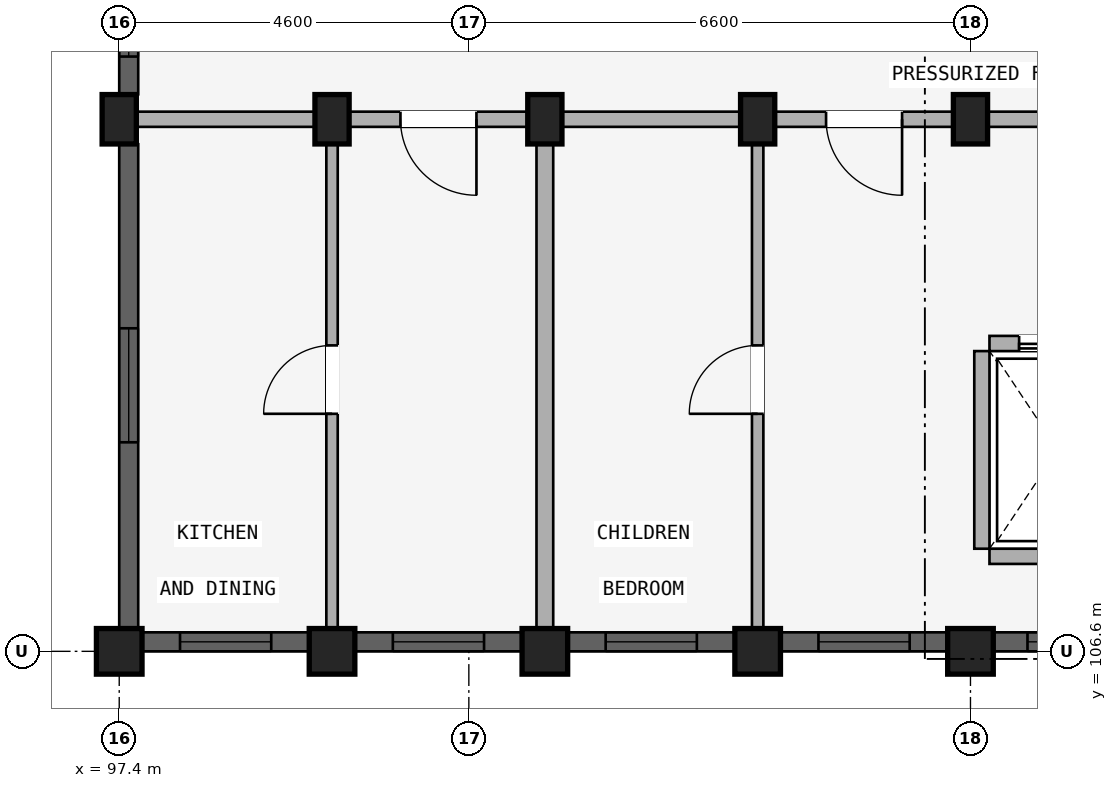
"""IFC4 building model, lengths in metres.
Left out: names, types, materials, properties, quantities, classifications, styles, units other than length and angle.
Written with IfcOpenShell. Run it as: python <this file> out.ifc"""

import sys

from ifc_helpers import new_model, si_unit, direction, frame, frame_2d, origin, origin_2d, place, context, subcontext, project, spatial, rectangle, extrude, element, fill, save


model = new_model("IFC4")
c1 = context("Model", 3, precision=1e-05, world=origin(), true_north=direction((0.0, 1.0)))
c2 = subcontext(c1, "Body", "Model", "MODEL_VIEW")
j1 = project(units=[si_unit("LENGTHUNIT", "METRE"), si_unit("PLANEANGLEUNIT", "RADIAN")], contexts=[c1])
p1 = place(None, origin())
s1 = spatial("IfcSite", under=j1, at=p1, CompositionType="ELEMENT")
p2 = place(p1, origin())
s2 = spatial("IfcBuilding", under=s1, at=p2, CompositionType="ELEMENT")
p3 = place(p2, frame((0.0, 0.0, 30.75)))
s3 = spatial("IfcBuildingStorey", under=s2, at=p3, CompositionType="ELEMENT", Elevation=30.75)
p4 = place(p3, frame((108.6, 106.6, 0.0), z_axis=(0.0, 0.0, 1.0), x_axis=(1.0, 0.0, 0.0)))
e1 = element("IfcColumn", 1, at=p4, inside=s3, PredefinedType="COLUMN", context=c2, shape_type="SweptSolid", body=[
    extrude(rectangle(XDim=0.6, YDim=0.6, at=origin_2d()), origin(), (0.0, 0.0, 1.0), 2.93),
])
p5 = place(p3, frame((108.6, 113.6, 0.0), z_axis=(0.0, 0.0, 1.0), x_axis=(1.0, 0.0, 0.0)))
e2 = element("IfcColumn", 2, at=p5, inside=s3, PredefinedType="COLUMN", context=c2, shape_type="SweptSolid", body=[
    extrude(rectangle(XDim=0.45, YDim=0.65, at=origin_2d()), origin(), (0.0, 0.0, 1.0), 2.93),
])
p6 = place(p3, frame((105.8, 106.6, 0.0), z_axis=(0.0, 0.0, 1.0), x_axis=(1.0, 0.0, 0.0)))
e3 = element("IfcColumn", 3, at=p6, inside=s3, PredefinedType="COLUMN", context=c2, shape_type="SweptSolid", body=[
    extrude(rectangle(XDim=0.6, YDim=0.6, at=origin_2d()), origin(), (0.0, 0.0, 1.0), 2.93),
])
p7 = place(p3, frame((105.8, 113.6, 0.0), z_axis=(0.0, 0.0, 1.0), x_axis=(1.0, 0.0, 0.0)))
e4 = element("IfcColumn", 4, at=p7, inside=s3, PredefinedType="COLUMN", context=c2, shape_type="SweptSolid", body=[
    extrude(rectangle(XDim=0.45, YDim=0.65, at=origin_2d()), origin(), (0.0, 0.0, 1.0), 2.93),
])
p8 = place(p3, frame((103.0, 106.6, 0.0), z_axis=(0.0, 0.0, 1.0), x_axis=(1.0, 0.0, 0.0)))
e5 = element("IfcColumn", 5, at=p8, inside=s3, PredefinedType="COLUMN", context=c2, shape_type="SweptSolid", body=[
    extrude(rectangle(XDim=0.6, YDim=0.6, at=origin_2d()), origin(), (0.0, 0.0, 1.0), 2.93),
])
p9 = place(p3, frame((103.0, 113.6, 0.0), z_axis=(0.0, 0.0, 1.0), x_axis=(1.0, 0.0, 0.0)))
e6 = element("IfcColumn", 6, at=p9, inside=s3, PredefinedType="COLUMN", context=c2, shape_type="SweptSolid", body=[
    extrude(rectangle(XDim=0.45, YDim=0.65, at=origin_2d()), origin(), (0.0, 0.0, 1.0), 2.93),
])
p10 = place(p3, frame((100.2, 106.6, 0.0), z_axis=(0.0, 0.0, 1.0), x_axis=(1.0, 0.0, 0.0)))
e7 = element("IfcColumn", 7, at=p10, inside=s3, PredefinedType="COLUMN", context=c2, shape_type="SweptSolid", body=[
    extrude(rectangle(XDim=0.6, YDim=0.6, at=origin_2d()), origin(), (0.0, 0.0, 1.0), 2.93),
])
p11 = place(p3, frame((100.2, 113.6, 0.0), z_axis=(0.0, 0.0, 1.0), x_axis=(1.0, 0.0, 0.0)))
e8 = element("IfcColumn", 8, at=p11, inside=s3, PredefinedType="COLUMN", context=c2, shape_type="SweptSolid", body=[
    extrude(rectangle(XDim=0.45, YDim=0.65, at=origin_2d()), origin(), (0.0, 0.0, 1.0), 2.93),
])
p12 = place(p3, frame((97.4, 106.6, 0.0), z_axis=(0.0, 0.0, 1.0), x_axis=(1.0, 0.0, 0.0)))
e9 = element("IfcColumn", 9, at=p12, inside=s3, PredefinedType="COLUMN", context=c2, shape_type="SweptSolid", body=[
    extrude(rectangle(XDim=0.6, YDim=0.6, at=origin_2d()), origin(), (0.0, 0.0, 1.0), 2.93),
])
p13 = place(p3, frame((97.4, 113.6, 0.0), z_axis=(0.0, 0.0, 1.0), x_axis=(1.0, 0.0, 0.0)))
e10 = element("IfcColumn", 10, at=p13, inside=s3, PredefinedType="COLUMN", context=c2, shape_type="SweptSolid", body=[
    extrude(rectangle(XDim=0.45, YDim=0.65, at=origin_2d()), origin(), (0.0, 0.0, 1.0), 2.93),
])
p14 = place(p3, frame((108.75, 107.95, 0.0), z_axis=(0.0, 0.0, 1.0), x_axis=(0.0, 1.0, 0.0)))
e11 = element("IfcWall", 11, at=p14, inside=s3, PredefinedType="STANDARD", context=c2, shape_type="SweptSolid", body=[
    extrude(rectangle(XDim=2.6, YDim=0.2, at=frame_2d((1.3, 0.0))), origin(), (0.0, 0.0, 1.0), 2.372),
])
p15 = place(p3, frame((110.65, 107.85, 0.0), z_axis=(0.0, 0.0, 1.0), x_axis=(-1.0, 0.0, 0.0)))
e12 = element("IfcWall", 12, at=p15, inside=s3, PredefinedType="STANDARD", context=c2, shape_type="SweptSolid", body=[
    extrude(rectangle(XDim=1.8, YDim=0.2, at=frame_2d((0.9, 0.0))), origin(), (0.0, 0.0, 1.0), 2.93),
])
p16 = place(p3, frame((110.65, 110.65, 0.0), z_axis=(0.0, 0.0, 1.0), x_axis=(-1.0, 0.0, 0.0)))
e13 = element("IfcWall", 13, at=p16, inside=s3, PredefinedType="STANDARD", context=c2, shape_type="SweptSolid", body=[
    extrude(rectangle(XDim=1.8, YDim=0.2, at=frame_2d((0.9, 0.0))), origin(), (0.0, 0.0, 1.0), 2.93),
])
p17 = place(p16, frame((0.39, 0.0, 0.0)))
e14 = element("IfcOpeningElement", 14, at=p17, cuts=e13, PredefinedType="OPENING", context=c2, shape_type="SweptSolid", body=[
    extrude(rectangle(XDim=1.02, YDim=2.15, at=frame_2d((0.51, 1.075))), frame((0.0, 0.11, 0.0), z_axis=(0.0, -1.0, 0.0), x_axis=(1.0, 0.0, 0.0)), (0.0, 0.0, 1.0), 0.22),
])
p18 = place(p3, frame((114.25, 113.6, 0.0), z_axis=(0.0, 0.0, 1.0), x_axis=(-1.0, 0.0, 0.0)))
e15 = element("IfcWall", 15, at=p18, inside=s3, PredefinedType="STANDARD", context=c2, shape_type="SweptSolid", body=[
    extrude(rectangle(XDim=5.6, YDim=0.2, at=frame_2d((2.8, 0.0))), origin(), (0.0, 0.0, 1.0), 2.372),
])
p19 = place(p18, frame((1.91, 0.0, 0.0)))
e16 = element("IfcOpeningElement", 16, at=p19, cuts=e15, PredefinedType="OPENING", context=c2, shape_type="SweptSolid", body=[
    extrude(rectangle(XDim=1.22, YDim=2.15, at=frame_2d((0.61, 1.075))), frame((0.0, 0.11, 0.0), z_axis=(0.0, -1.0, 0.0), x_axis=(1.0, 0.0, 0.0)), (0.0, 0.0, 1.0), 0.22),
])
p20 = place(p3, frame((108.6, 113.6, 0.0), z_axis=(0.0, 0.0, 1.0), x_axis=(-1.0, 0.0, 0.0)))
e17 = element("IfcWall", 17, at=p20, inside=s3, PredefinedType="STANDARD", context=c2, shape_type="SweptSolid", body=[
    extrude(rectangle(XDim=2.8, YDim=0.2, at=frame_2d((1.4, 0.0))), origin(), (0.0, 0.0, 1.0), 2.372),
])
p21 = place(p20, frame((0.9, 0.0, 0.0)))
e18 = element("IfcOpeningElement", 18, at=p21, cuts=e17, PredefinedType="OPENING", context=c2, shape_type="SweptSolid", body=[
    extrude(rectangle(XDim=1.0, YDim=2.15, at=frame_2d((0.5, 1.075))), frame((0.0, 0.11, 0.0), z_axis=(0.0, -1.0, 0.0), x_axis=(1.0, 0.0, 0.0)), (0.0, 0.0, 1.0), 0.22),
])
p22 = place(p3, frame((105.8, 113.6, 0.0), z_axis=(0.0, 0.0, 1.0), x_axis=(-1.0, 0.0, 0.0)))
e19 = element("IfcWall", 19, at=p22, inside=s3, PredefinedType="STANDARD", context=c2, shape_type="SweptSolid", body=[
    extrude(rectangle(XDim=2.8, YDim=0.2, at=frame_2d((1.4, 0.0))), origin(), (0.0, 0.0, 1.0), 2.372),
])
p23 = place(p3, frame((103.0, 113.6, 0.0), z_axis=(0.0, 0.0, 1.0), x_axis=(-1.0, 0.0, 0.0)))
e20 = element("IfcWall", 20, at=p23, inside=s3, PredefinedType="STANDARD", context=c2, shape_type="SweptSolid", body=[
    extrude(rectangle(XDim=2.8, YDim=0.2, at=frame_2d((1.4, 0.0))), origin(), (0.0, 0.0, 1.0), 2.372),
])
p24 = place(p23, frame((0.9, 0.0, 0.0)))
e21 = element("IfcOpeningElement", 21, at=p24, cuts=e20, PredefinedType="OPENING", context=c2, shape_type="SweptSolid", body=[
    extrude(rectangle(XDim=1.0, YDim=2.15, at=frame_2d((0.5, 1.075))), frame((0.0, 0.11, 0.0), z_axis=(0.0, -1.0, 0.0), x_axis=(1.0, 0.0, 0.0)), (0.0, 0.0, 1.0), 0.22),
])
p25 = place(p3, frame((100.2, 113.6, 0.0), z_axis=(0.0, 0.0, 1.0), x_axis=(-1.0, 0.0, 0.0)))
e22 = element("IfcWall", 22, at=p25, inside=s3, PredefinedType="STANDARD", context=c2, shape_type="SweptSolid", body=[
    extrude(rectangle(XDim=2.8, YDim=0.2, at=frame_2d((1.4, 0.0))), origin(), (0.0, 0.0, 1.0), 2.372),
])
p26 = place(p3, frame((105.8, 106.8, 0.0), z_axis=(0.0, 0.0, 1.0), x_axis=(0.0, 1.0, 0.0)))
e23 = element("IfcWall", 23, at=p26, inside=s3, PredefinedType="PARTITIONING", context=c2, shape_type="SweptSolid", body=[
    extrude(rectangle(XDim=6.75, YDim=0.15, at=frame_2d((3.375, 0.0))), origin(), (0.0, 0.0, 1.0), 2.372),
])
p27 = place(p26, frame((2.925, 0.0, 0.0)))
e24 = element("IfcOpeningElement", 24, at=p27, cuts=e23, PredefinedType="OPENING", context=c2, shape_type="SweptSolid", body=[
    extrude(rectangle(XDim=0.9, YDim=2.1, at=frame_2d((0.45, 1.05))), frame((0.0, 0.085, 0.0), z_axis=(0.0, -1.0, 0.0), x_axis=(1.0, 0.0, 0.0)), (0.0, 0.0, 1.0), 0.17),
])
p28 = place(p3, frame((103.0, 106.8, 0.0), z_axis=(0.0, 0.0, 1.0), x_axis=(0.0, 1.0, 0.0)))
e25 = element("IfcWall", 25, at=p28, inside=s3, PredefinedType="STANDARD", context=c2, shape_type="SweptSolid", body=[
    extrude(rectangle(XDim=6.75, YDim=0.22, at=frame_2d((3.375, 0.0))), origin(), (0.0, 0.0, 1.0), 2.372),
])
p29 = place(p3, frame((100.2, 106.8, 0.0), z_axis=(0.0, 0.0, 1.0), x_axis=(0.0, 1.0, 0.0)))
e26 = element("IfcWall", 26, at=p29, inside=s3, PredefinedType="PARTITIONING", context=c2, shape_type="SweptSolid", body=[
    extrude(rectangle(XDim=6.75, YDim=0.15, at=frame_2d((3.375, 0.0))), origin(), (0.0, 0.0, 1.0), 2.372),
])
p30 = place(p29, frame((2.925, 0.0, 0.0)))
e27 = element("IfcOpeningElement", 27, at=p30, cuts=e26, PredefinedType="OPENING", context=c2, shape_type="SweptSolid", body=[
    extrude(rectangle(XDim=0.9, YDim=2.1, at=frame_2d((0.45, 1.05))), frame((0.0, 0.085, 0.0), z_axis=(0.0, -1.0, 0.0), x_axis=(1.0, 0.0, 0.0)), (0.0, 0.0, 1.0), 0.17),
])
p31 = place(p3, frame((111.372, 106.725, 0.0), z_axis=(0.0, 0.0, 1.0), x_axis=(-1.0, 0.0, 0.0)))
e28 = element("IfcWall", 28, at=p31, inside=s3, PredefinedType="STANDARD", context=c2, shape_type="SweptSolid", body=[
    extrude(rectangle(XDim=2.468, YDim=0.25, at=frame_2d((1.234, 0.0))), origin(), (0.0, 0.0, 1.0), 2.472),
])
p32 = place(p31, frame((0.822, 0.0, 0.772)))
e29 = element("IfcOpeningElement", 29, at=p32, cuts=e28, PredefinedType="OPENING", context=c2, shape_type="SweptSolid", body=[
    extrude(rectangle(XDim=1.2, YDim=1.5, at=frame_2d((0.6, 0.75))), frame((0.0, 0.135, 0.0), z_axis=(0.0, -1.0, 0.0), x_axis=(1.0, 0.0, 0.0)), (0.0, 0.0, 1.0), 0.27),
])
p33 = place(p3, frame((108.296, 106.725, 0.0), z_axis=(0.0, 0.0, 1.0), x_axis=(-1.0, 0.0, 0.0)))
e30 = element("IfcWall", 30, at=p33, inside=s3, PredefinedType="STANDARD", context=c2, shape_type="SweptSolid", body=[
    extrude(rectangle(XDim=2.193, YDim=0.25, at=frame_2d((1.096, 0.0))), origin(), (0.0, 0.0, 1.0), 2.472),
])
p34 = place(p33, frame((0.497, 0.0, 0.772)))
e31 = element("IfcOpeningElement", 31, at=p34, cuts=e30, PredefinedType="OPENING", context=c2, shape_type="SweptSolid", body=[
    extrude(rectangle(XDim=1.2, YDim=1.5, at=frame_2d((0.6, 0.75))), frame((0.0, 0.135, 0.0), z_axis=(0.0, -1.0, 0.0), x_axis=(1.0, 0.0, 0.0)), (0.0, 0.0, 1.0), 0.27),
])
p35 = place(p3, frame((105.497, 106.725, 0.0), z_axis=(0.0, 0.0, 1.0), x_axis=(-1.0, 0.0, 0.0)))
e32 = element("IfcWall", 32, at=p35, inside=s3, PredefinedType="STANDARD", context=c2, shape_type="SweptSolid", body=[
    extrude(rectangle(XDim=2.193, YDim=0.25, at=frame_2d((1.097, 0.0))), origin(), (0.0, 0.0, 1.0), 2.472),
])
p36 = place(p35, frame((0.497, 0.0, 0.772)))
e33 = element("IfcOpeningElement", 33, at=p36, cuts=e32, PredefinedType="OPENING", context=c2, shape_type="SweptSolid", body=[
    extrude(rectangle(XDim=1.2, YDim=1.5, at=frame_2d((0.6, 0.75))), frame((0.0, 0.135, 0.0), z_axis=(0.0, -1.0, 0.0), x_axis=(1.0, 0.0, 0.0)), (0.0, 0.0, 1.0), 0.27),
])
p37 = place(p3, frame((102.697, 106.725, 0.0), z_axis=(0.0, 0.0, 1.0), x_axis=(-1.0, 0.0, 0.0)))
e34 = element("IfcWall", 34, at=p37, inside=s3, PredefinedType="STANDARD", context=c2, shape_type="SweptSolid", body=[
    extrude(rectangle(XDim=2.193, YDim=0.25, at=frame_2d((1.097, 0.0))), origin(), (0.0, 0.0, 1.0), 2.472),
])
p38 = place(p37, frame((0.497, 0.0, 0.772)))
e35 = element("IfcOpeningElement", 35, at=p38, cuts=e34, PredefinedType="OPENING", context=c2, shape_type="SweptSolid", body=[
    extrude(rectangle(XDim=1.2, YDim=1.5, at=frame_2d((0.6, 0.75))), frame((0.0, 0.135, 0.0), z_axis=(0.0, -1.0, 0.0), x_axis=(1.0, 0.0, 0.0)), (0.0, 0.0, 1.0), 0.27),
])
p39 = place(p3, frame((99.896, 106.725, 0.0), z_axis=(0.0, 0.0, 1.0), x_axis=(-1.0, 0.0, 0.0)))
e36 = element("IfcWall", 36, at=p39, inside=s3, PredefinedType="STANDARD", context=c2, shape_type="SweptSolid", body=[
    extrude(rectangle(XDim=2.193, YDim=0.25, at=frame_2d((1.096, 0.0))), origin(), (0.0, 0.0, 1.0), 2.472),
])
p40 = place(p39, frame((0.497, 0.0, 0.772)))
e37 = element("IfcOpeningElement", 37, at=p40, cuts=e36, PredefinedType="OPENING", context=c2, shape_type="SweptSolid", body=[
    extrude(rectangle(XDim=1.2, YDim=1.5, at=frame_2d((0.6, 0.75))), frame((0.0, 0.135, 0.0), z_axis=(0.0, -1.0, 0.0), x_axis=(1.0, 0.0, 0.0)), (0.0, 0.0, 1.0), 0.27),
])
p41 = place(p3, frame((97.525, 106.904, 0.0), z_axis=(0.0, 0.0, 1.0), x_axis=(0.0, 1.0, 0.0)))
e38 = element("IfcWall", 38, at=p41, inside=s3, PredefinedType="STANDARD", context=c2, shape_type="SweptSolid", body=[
    extrude(rectangle(XDim=6.368, YDim=0.25, at=frame_2d((3.184, 0.0))), origin(), (0.0, 0.0, 1.0), 2.372),
])
p42 = place(p41, frame((2.447, 0.0, 0.522)))
e39 = element("IfcOpeningElement", 39, at=p42, cuts=e38, PredefinedType="OPENING", context=c2, shape_type="SweptSolid", body=[
    extrude(rectangle(XDim=1.5, YDim=1.65, at=frame_2d((0.75, 0.825))), frame((0.0, 0.135, 0.0), z_axis=(0.0, -1.0, 0.0), x_axis=(1.0, 0.0, 0.0)), (0.0, 0.0, 1.0), 0.27),
])
p43 = place(p3, frame((97.525, 113.928, 0.0), z_axis=(0.0, 0.0, 1.0), x_axis=(0.0, 1.0, 0.0)))
e40 = element("IfcWall", 40, at=p43, inside=s3, PredefinedType="STANDARD", context=c2, shape_type="SweptSolid", body=[
    extrude(rectangle(XDim=1.743, YDim=0.25, at=frame_2d((0.872, 0.0))), origin(), (0.0, 0.0, 1.0), 2.372),
])
p44 = place(p43, frame((0.497, 0.0, 0.88)))
e41 = element("IfcOpeningElement", 41, at=p44, cuts=e40, PredefinedType="OPENING", context=c2, shape_type="SweptSolid", body=[
    extrude(rectangle(XDim=0.75, YDim=1.05, at=frame_2d((0.375, 0.525))), frame((0.0, 0.135, 0.0), z_axis=(0.0, -1.0, 0.0), x_axis=(1.0, 0.0, 0.0)), (0.0, 0.0, 1.0), 0.27),
])
p45 = place(p32, origin())
e42 = element("IfcWindow", 42, at=p45, inside=s3, PartitioningType="SINGLE_PANEL", PredefinedType="WINDOW", context=c2, shape_type="SweptSolid", body=[
    extrude(rectangle(XDim=1.2, YDim=1.5, at=frame_2d((0.6, 0.75))), frame((0.0, 0.03, 0.0), z_axis=(0.0, -1.0, 0.0), x_axis=(1.0, 0.0, 0.0)), (0.0, 0.0, 1.0), 0.06),
])
fill(e29, e42)
p46 = place(p34, origin())
e43 = element("IfcWindow", 43, at=p46, inside=s3, PartitioningType="SINGLE_PANEL", PredefinedType="WINDOW", context=c2, shape_type="SweptSolid", body=[
    extrude(rectangle(XDim=1.2, YDim=1.5, at=frame_2d((0.6, 0.75))), frame((0.0, 0.03, 0.0), z_axis=(0.0, -1.0, 0.0), x_axis=(1.0, 0.0, 0.0)), (0.0, 0.0, 1.0), 0.06),
])
fill(e31, e43)
p47 = place(p36, origin())
e44 = element("IfcWindow", 44, at=p47, inside=s3, PartitioningType="SINGLE_PANEL", PredefinedType="WINDOW", context=c2, shape_type="SweptSolid", body=[
    extrude(rectangle(XDim=1.2, YDim=1.5, at=frame_2d((0.6, 0.75))), frame((0.0, 0.03, 0.0), z_axis=(0.0, -1.0, 0.0), x_axis=(1.0, 0.0, 0.0)), (0.0, 0.0, 1.0), 0.06),
])
fill(e33, e44)
p48 = place(p38, origin())
e45 = element("IfcWindow", 45, at=p48, inside=s3, PartitioningType="SINGLE_PANEL", PredefinedType="WINDOW", context=c2, shape_type="SweptSolid", body=[
    extrude(rectangle(XDim=1.2, YDim=1.5, at=frame_2d((0.6, 0.75))), frame((0.0, 0.03, 0.0), z_axis=(0.0, -1.0, 0.0), x_axis=(1.0, 0.0, 0.0)), (0.0, 0.0, 1.0), 0.06),
])
fill(e35, e45)
p49 = place(p40, origin())
e46 = element("IfcWindow", 46, at=p49, inside=s3, PartitioningType="SINGLE_PANEL", PredefinedType="WINDOW", context=c2, shape_type="SweptSolid", body=[
    extrude(rectangle(XDim=1.2, YDim=1.5, at=frame_2d((0.6, 0.75))), frame((0.0, 0.03, 0.0), z_axis=(0.0, -1.0, 0.0), x_axis=(1.0, 0.0, 0.0)), (0.0, 0.0, 1.0), 0.06),
])
fill(e37, e46)
p50 = place(p42, origin())
e47 = element("IfcWindow", 47, at=p50, inside=s3, PartitioningType="DOUBLE_PANEL_VERTICAL", PredefinedType="WINDOW", context=c2, shape_type="SweptSolid", body=[
    extrude(rectangle(XDim=1.5, YDim=1.65, at=frame_2d((0.75, 0.825))), frame((0.0, 0.03, 0.0), z_axis=(0.0, -1.0, 0.0), x_axis=(1.0, 0.0, 0.0)), (0.0, 0.0, 1.0), 0.06),
])
fill(e39, e47)
p51 = place(p44, origin())
e48 = element("IfcWindow", 48, at=p51, inside=s3, PartitioningType="SINGLE_PANEL", PredefinedType="WINDOW", context=c2, shape_type="SweptSolid", body=[
    extrude(rectangle(XDim=0.75, YDim=1.05, at=frame_2d((0.375, 0.525))), frame((0.0, 0.03, 0.0), z_axis=(0.0, -1.0, 0.0), x_axis=(1.0, 0.0, 0.0)), (0.0, 0.0, 1.0), 0.06),
])
fill(e41, e48)
p52 = place(p17, origin())
e49 = element("IfcDoor", 49, at=p52, inside=s3, OperationType="SLIDING_TO_RIGHT", PredefinedType="DOOR", context=c2, shape_type="SweptSolid", body=[
    extrude(rectangle(XDim=1.02, YDim=2.15, at=frame_2d((0.51, 1.075))), frame((0.0, 0.025, 0.0), z_axis=(0.0, -1.0, 0.0), x_axis=(1.0, 0.0, 0.0)), (0.0, 0.0, 1.0), 0.05),
])
fill(e14, e49)
p53 = place(p21, origin())
e50 = element("IfcDoor", 50, at=p53, inside=s3, OperationType="SINGLE_SWING_LEFT", PredefinedType="DOOR", context=c2, shape_type="SweptSolid", body=[
    extrude(rectangle(XDim=1.0, YDim=2.15, at=frame_2d((0.5, 1.075))), frame((0.0, 0.025, 0.0), z_axis=(0.0, -1.0, 0.0), x_axis=(1.0, 0.0, 0.0)), (0.0, 0.0, 1.0), 0.05),
])
fill(e18, e50)
p54 = place(p24, origin())
e51 = element("IfcDoor", 51, at=p54, inside=s3, OperationType="SINGLE_SWING_LEFT", PredefinedType="DOOR", context=c2, shape_type="SweptSolid", body=[
    extrude(rectangle(XDim=1.0, YDim=2.15, at=frame_2d((0.5, 1.075))), frame((0.0, 0.025, 0.0), z_axis=(0.0, -1.0, 0.0), x_axis=(1.0, 0.0, 0.0)), (0.0, 0.0, 1.0), 0.05),
])
fill(e21, e51)
p55 = place(p27, frame((0.9, 0.0, 0.0), z_axis=(0.0, 0.0, 1.0), x_axis=(-1.0, 0.0, 0.0)))
e52 = element("IfcDoor", 52, at=p55, inside=s3, OperationType="SINGLE_SWING_RIGHT", PredefinedType="DOOR", context=c2, shape_type="SweptSolid", body=[
    extrude(rectangle(XDim=0.9, YDim=2.1, at=frame_2d((0.45, 1.05))), frame((0.0, 0.025, 0.0), z_axis=(0.0, -1.0, 0.0), x_axis=(1.0, 0.0, 0.0)), (0.0, 0.0, 1.0), 0.05),
])
fill(e24, e52)
p56 = place(p30, origin())
e53 = element("IfcDoor", 53, at=p56, inside=s3, OperationType="SINGLE_SWING_LEFT", PredefinedType="DOOR", context=c2, shape_type="SweptSolid", body=[
    extrude(rectangle(XDim=0.9, YDim=2.1, at=frame_2d((0.45, 1.05))), frame((0.0, 0.025, 0.0), z_axis=(0.0, -1.0, 0.0), x_axis=(1.0, 0.0, 0.0)), (0.0, 0.0, 1.0), 0.05),
])
fill(e27, e53)
save(model, sys.argv[1])
